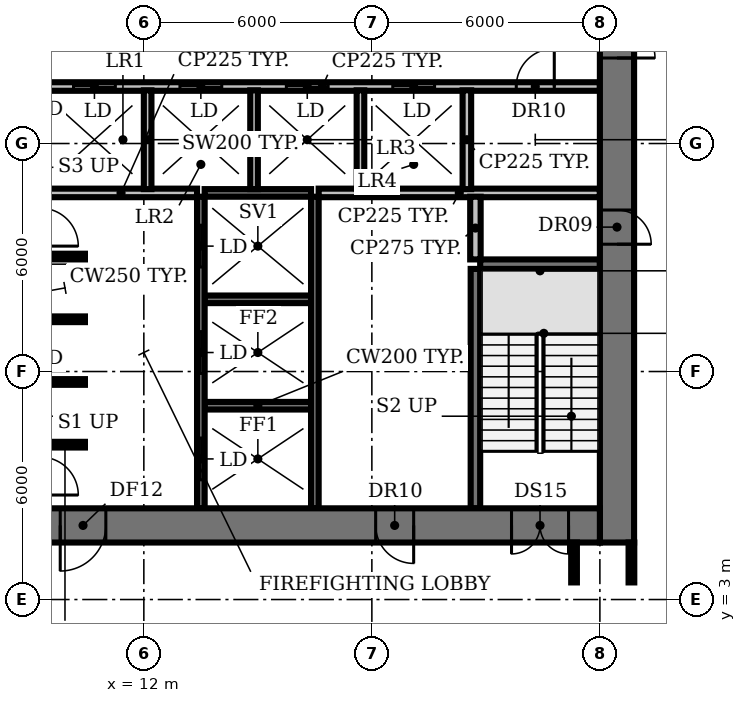
"""IFC4 building model, lengths in metres.
Left out: names, types, materials, properties, quantities, classifications, styles, units other than length and angle.
Written with IfcOpenShell. Run it as: python <this file> out.ifc"""

import sys

from ifc_helpers import new_model, si_unit, direction, frame, frame_2d, origin, place, context, subcontext, project, spatial, rectangle, extrude, element, fill, save


model = new_model("IFC4")
c1 = context("Model", 3, precision=1e-05, world=origin(), true_north=direction((0.0, 1.0)))
c2 = subcontext(c1, "Body", "Model", "MODEL_VIEW")
j1 = project(units=[si_unit("LENGTHUNIT", "METRE"), si_unit("PLANEANGLEUNIT", "RADIAN")], contexts=[c1])
p1 = place(None, origin())
s1 = spatial("IfcSite", under=j1, at=p1, CompositionType="ELEMENT")
p2 = place(p1, origin())
s2 = spatial("IfcBuilding", under=s1, at=p2, CompositionType="ELEMENT")
p3 = place(p2, frame((0.0, 0.0, 11.0)))
s3 = spatial("IfcBuildingStorey", under=s2, at=p3, CompositionType="ELEMENT", Elevation=11.0)
p4 = place(p3, frame((9.4, 7.075, 0.0), z_axis=(0.0, 0.0, 1.0), x_axis=(1.0, 0.0, 0.0)))
e1 = element("IfcWall", 1, at=p4, inside=s3, PredefinedType="SHEAR", context=c2, shape_type="SweptSolid", body=[
    extrude(rectangle(XDim=1.05, YDim=0.15, at=frame_2d((0.525, 0.0))), origin(), (0.0, 0.0, 1.0), 4.15),
])
p5 = place(p3, frame((13.6, 8.1, 0.0), z_axis=(0.0, 0.0, 1.0), x_axis=(1.0, 0.0, 0.0)))
e2 = element("IfcWall", 2, at=p5, inside=s3, PredefinedType="SHEAR", context=c2, shape_type="SweptSolid", body=[
    extrude(rectangle(XDim=2.8, YDim=0.2, at=frame_2d((1.4, 0.0))), origin(), (0.0, 0.0, 1.0), 4.15),
])
for number, where, z_axis, x_axis in (
    (3, (9.4, 8.725, 0.0), (0.0, 0.0, 1.0), (1.0, 0.0, 0.0)),
    (4, (9.4, 10.375, 0.0), (0.0, 0.0, 1.0), (1.0, 0.0, 0.0)),
):
    element("IfcWall", number, at=place(p3, frame(where, z_axis=z_axis, x_axis=x_axis)), inside=s3, PredefinedType="SHEAR", context=c2, shape_type="SweptSolid", body=[
        extrude(rectangle(XDim=1.05, YDim=0.15, at=frame_2d((0.525, 0.0))), origin(), (0.0, 0.0, 1.0), 4.15),
    ])
p6 = place(p3, frame((13.6, 10.9, 0.0), z_axis=(0.0, 0.0, 1.0), x_axis=(1.0, 0.0, 0.0)))
e5 = element("IfcWall", 5, at=p6, inside=s3, PredefinedType="SHEAR", context=c2, shape_type="SweptSolid", body=[
    extrude(rectangle(XDim=2.8, YDim=0.2, at=frame_2d((1.4, 0.0))), origin(), (0.0, 0.0, 1.0), 4.15),
])
p7 = place(p3, frame((20.85, 11.825, 0.0), z_axis=(0.0, 0.0, 1.0), x_axis=(1.0, 0.0, 0.0)))
e6 = element("IfcWall", 6, at=p7, inside=s3, PredefinedType="SHEAR", context=c2, shape_type="SweptSolid", body=[
    extrude(rectangle(XDim=3.15, YDim=0.25, at=frame_2d((1.575, 0.0))), origin(), (0.0, 0.0, 1.0), 4.15),
])
p8 = place(p3, frame((9.4, 12.025, 0.0), z_axis=(0.0, 0.0, 1.0), x_axis=(1.0, 0.0, 0.0)))
e7 = element("IfcWall", 7, at=p8, inside=s3, PredefinedType="SHEAR", context=c2, shape_type="SweptSolid", body=[
    extrude(rectangle(XDim=1.05, YDim=0.15, at=frame_2d((0.525, 0.0))), origin(), (0.0, 0.0, 1.0), 4.15),
])
p9 = place(p3, frame((9.4, 13.7, 0.0), z_axis=(0.0, 0.0, 1.0), x_axis=(1.0, 0.0, 0.0)))
e8 = element("IfcWall", 8, at=p9, inside=s3, PredefinedType="PARTITIONING", context=c2, shape_type="SweptSolid", body=[
    extrude(rectangle(XDim=4.0, YDim=0.225, at=frame_2d((2.0, 0.0))), origin(), (0.0, 0.0, 1.0), 4.15),
])
p10 = place(p3, frame((13.6, 13.7, 0.0), z_axis=(0.0, 0.0, 1.0), x_axis=(1.0, 0.0, 0.0)))
e9 = element("IfcWall", 9, at=p10, inside=s3, PredefinedType="SHEAR", context=c2, shape_type="SweptSolid", body=[
    extrude(rectangle(XDim=2.8, YDim=0.2, at=frame_2d((1.4, 0.0))), origin(), (0.0, 0.0, 1.0), 4.15),
])
p11 = place(p3, frame((16.6, 13.7, 0.0), z_axis=(0.0, 0.0, 1.0), x_axis=(1.0, 0.0, 0.0)))
e10 = element("IfcWall", 10, at=p11, inside=s3, PredefinedType="PARTITIONING", context=c2, shape_type="SweptSolid", body=[
    extrude(rectangle(XDim=7.4, YDim=0.225, at=frame_2d((3.7, 0.0))), origin(), (0.0, 0.0, 1.0), 4.15),
])
p12 = place(p3, frame((9.4, 16.5, 0.0), z_axis=(0.0, 0.0, 1.0), x_axis=(1.0, 0.0, 0.0)))
e11 = element("IfcWall", 11, at=p12, inside=s3, PredefinedType="PARTITIONING", context=c2, shape_type="SweptSolid", body=[
    extrude(rectangle(XDim=14.6, YDim=0.225, at=frame_2d((7.3, 0.0))), origin(), (0.0, 0.0, 1.0), 4.15),
])
p13 = place(p12, frame((0.75, 0.0, 0.0)))
e12 = element("IfcOpeningElement", 12, at=p13, cuts=e11, PredefinedType="OPENING", context=c2, shape_type="SweptSolid", body=[
    extrude(rectangle(XDim=1.1, YDim=2.1, at=frame_2d((0.55, 1.05))), frame((0.0, 0.123, 0.0), z_axis=(0.0, -1.0, 0.0), x_axis=(1.0, 0.0, 0.0)), (0.0, 0.0, 1.0), 0.245),
])
p14 = place(p12, frame((3.55, 0.0, 0.0)))
e13 = element("IfcOpeningElement", 13, at=p14, cuts=e11, PredefinedType="OPENING", context=c2, shape_type="SweptSolid", body=[
    extrude(rectangle(XDim=1.1, YDim=2.1, at=frame_2d((0.55, 1.05))), frame((0.0, 0.123, 0.0), z_axis=(0.0, -1.0, 0.0), x_axis=(1.0, 0.0, 0.0)), (0.0, 0.0, 1.0), 0.245),
])
p15 = place(p12, frame((6.35, 0.0, 0.0)))
e14 = element("IfcOpeningElement", 14, at=p15, cuts=e11, PredefinedType="OPENING", context=c2, shape_type="SweptSolid", body=[
    extrude(rectangle(XDim=1.1, YDim=2.1, at=frame_2d((0.55, 1.05))), frame((0.0, 0.123, 0.0), z_axis=(0.0, -1.0, 0.0), x_axis=(1.0, 0.0, 0.0)), (0.0, 0.0, 1.0), 0.245),
])
p16 = place(p12, frame((9.15, 0.0, 0.0)))
e15 = element("IfcOpeningElement", 15, at=p16, cuts=e11, PredefinedType="OPENING", context=c2, shape_type="SweptSolid", body=[
    extrude(rectangle(XDim=1.1, YDim=2.1, at=frame_2d((0.55, 1.05))), frame((0.0, 0.123, 0.0), z_axis=(0.0, -1.0, 0.0), x_axis=(1.0, 0.0, 0.0)), (0.0, 0.0, 1.0), 0.245),
])
p17 = place(p12, frame((12.4, 0.0, 0.0)))
e16 = element("IfcOpeningElement", 16, at=p17, cuts=e11, PredefinedType="OPENING", context=c2, shape_type="SweptSolid", body=[
    extrude(rectangle(XDim=1.0, YDim=2.1, at=frame_2d((0.5, 1.05))), frame((0.0, 0.123, 0.0), z_axis=(0.0, -1.0, 0.0), x_axis=(1.0, 0.0, 0.0)), (0.0, 0.0, 1.0), 0.245),
])
p18 = place(p3, frame((12.1, 13.8, 0.0), z_axis=(0.0, 0.0, 1.0), x_axis=(0.0, 1.0, 0.0)))
e17 = element("IfcWall", 17, at=p18, inside=s3, PredefinedType="SOLIDWALL", context=c2, shape_type="SweptSolid", body=[
    extrude(rectangle(XDim=2.6, YDim=0.2, at=frame_2d((1.3, 0.0))), origin(), (0.0, 0.0, 1.0), 4.15),
])
p19 = place(p3, frame((13.5, 5.4, 0.0), z_axis=(0.0, 0.0, 1.0), x_axis=(0.0, 1.0, 0.0)))
e18 = element("IfcWall", 18, at=p19, inside=s3, PredefinedType="SHEAR", context=c2, shape_type="SweptSolid", body=[
    extrude(rectangle(XDim=8.2, YDim=0.2, at=frame_2d((4.1, 0.0))), origin(), (0.0, 0.0, 1.0), 4.15),
])
p20 = place(p19, frame((0.75, 0.0, 0.0)))
e19 = element("IfcOpeningElement", 19, at=p20, cuts=e18, PredefinedType="OPENING", context=c2, shape_type="SweptSolid", body=[
    extrude(rectangle(XDim=1.1, YDim=2.1, at=frame_2d((0.55, 1.05))), frame((0.0, 0.11, 0.0), z_axis=(0.0, -1.0, 0.0), x_axis=(1.0, 0.0, 0.0)), (0.0, 0.0, 1.0), 0.22),
])
p21 = place(p19, frame((3.55, 0.0, 0.0)))
e20 = element("IfcOpeningElement", 20, at=p21, cuts=e18, PredefinedType="OPENING", context=c2, shape_type="SweptSolid", body=[
    extrude(rectangle(XDim=1.1, YDim=2.1, at=frame_2d((0.55, 1.05))), frame((0.0, 0.11, 0.0), z_axis=(0.0, -1.0, 0.0), x_axis=(1.0, 0.0, 0.0)), (0.0, 0.0, 1.0), 0.22),
])
p22 = place(p19, frame((6.35, 0.0, 0.0)))
e21 = element("IfcOpeningElement", 21, at=p22, cuts=e18, PredefinedType="OPENING", context=c2, shape_type="SweptSolid", body=[
    extrude(rectangle(XDim=1.1, YDim=2.1, at=frame_2d((0.55, 1.05))), frame((0.0, 0.11, 0.0), z_axis=(0.0, -1.0, 0.0), x_axis=(1.0, 0.0, 0.0)), (0.0, 0.0, 1.0), 0.22),
])
p23 = place(p3, frame((14.9, 13.8, 0.0), z_axis=(0.0, 0.0, 1.0), x_axis=(0.0, 1.0, 0.0)))
e22 = element("IfcWall", 22, at=p23, inside=s3, PredefinedType="SOLIDWALL", context=c2, shape_type="SweptSolid", body=[
    extrude(rectangle(XDim=2.6, YDim=0.2, at=frame_2d((1.3, 0.0))), origin(), (0.0, 0.0, 1.0), 4.15),
])
p24 = place(p3, frame((16.5, 5.4, 0.0), z_axis=(0.0, 0.0, 1.0), x_axis=(0.0, 1.0, 0.0)))
e23 = element("IfcWall", 23, at=p24, inside=s3, PredefinedType="SHEAR", context=c2, shape_type="SweptSolid", body=[
    extrude(rectangle(XDim=8.2, YDim=0.2, at=frame_2d((4.1, 0.0))), origin(), (0.0, 0.0, 1.0), 4.15),
])
p25 = place(p3, frame((17.7, 13.8, 0.0), z_axis=(0.0, 0.0, 1.0), x_axis=(0.0, 1.0, 0.0)))
e24 = element("IfcWall", 24, at=p25, inside=s3, PredefinedType="SOLIDWALL", context=c2, shape_type="SweptSolid", body=[
    extrude(rectangle(XDim=2.6, YDim=0.2, at=frame_2d((1.3, 0.0))), origin(), (0.0, 0.0, 1.0), 4.15),
])
p26 = place(p3, frame((20.5, 13.8, 0.0), z_axis=(0.0, 0.0, 1.0), x_axis=(0.0, 1.0, 0.0)))
e25 = element("IfcWall", 25, at=p26, inside=s3, PredefinedType="PARTITIONING", context=c2, shape_type="SweptSolid", body=[
    extrude(rectangle(XDim=2.6, YDim=0.225, at=frame_2d((1.3, 0.0))), origin(), (0.0, 0.0, 1.0), 4.15),
])
p27 = place(p3, frame((20.725, 5.4, 0.0), z_axis=(0.0, 0.0, 1.0), x_axis=(0.0, 1.0, 0.0)))
e26 = element("IfcWall", 26, at=p27, inside=s3, PredefinedType="SHEAR", context=c2, shape_type="SweptSolid", body=[
    extrude(rectangle(XDim=6.3, YDim=0.25, at=frame_2d((3.15, 0.0))), origin(), (0.0, 0.0, 1.0), 4.15),
])
p28 = place(p3, frame((20.725, 11.95, 0.0), z_axis=(0.0, 0.0, 1.0), x_axis=(0.0, 1.0, 0.0)))
e27 = element("IfcWall", 27, at=p28, inside=s3, PredefinedType="PARTITIONING", context=c2, shape_type="SweptSolid", body=[
    extrude(rectangle(XDim=1.65, YDim=0.275, at=frame_2d((0.825, 0.0))), origin(), (0.0, 0.0, 1.0), 4.15),
])
p29 = place(p3, frame((24.45, 25.7, 0.0), z_axis=(0.0, 0.0, 1.0), x_axis=(0.0, -1.0, 0.0)))
e28 = element("IfcWall", 28, at=p29, inside=s3, PredefinedType="SHEAR", context=c2, shape_type="SweptSolid", body=[
    extrude(rectangle(XDim=21.2, YDim=0.9, at=frame_2d((10.6, 0.0))), origin(), (0.0, 0.0, 1.0), 4.15),
])
p30 = place(p29, frame((12.45, 0.0, 0.0)))
e29 = element("IfcOpeningElement", 29, at=p30, cuts=e28, PredefinedType="OPENING", context=c2, shape_type="SweptSolid", body=[
    extrude(rectangle(XDim=0.9, YDim=2.1, at=frame_2d((0.45, 1.05))), frame((0.0, 0.46, 0.0), z_axis=(0.0, -1.0, 0.0), x_axis=(1.0, 0.0, 0.0)), (0.0, 0.0, 1.0), 0.92),
])
p31 = place(p29, frame((6.45, 0.0, 0.0)))
e30 = element("IfcOpeningElement", 30, at=p31, cuts=e28, PredefinedType="OPENING", context=c2, shape_type="SweptSolid", body=[
    extrude(rectangle(XDim=2.0, YDim=2.1, at=frame_2d((1.0, 1.05))), frame((0.0, 0.46, 0.0), z_axis=(0.0, -1.0, 0.0), x_axis=(1.0, 0.0, 0.0)), (0.0, 0.0, 1.0), 0.92),
])
p32 = place(p3, frame((24.0, 4.95, 0.0), z_axis=(0.0, 0.0, 1.0), x_axis=(-1.0, 0.0, 0.0)))
e31 = element("IfcWall", 31, at=p32, inside=s3, PredefinedType="SHEAR", context=c2, shape_type="SweptSolid", body=[
    extrude(rectangle(XDim=18.0, YDim=0.9, at=frame_2d((9.0, 0.0))), origin(), (0.0, 0.0, 1.0), 4.15),
])
p33 = place(p32, frame((15.675, 0.0, 0.0)))
e32 = element("IfcOpeningElement", 32, at=p33, cuts=e31, PredefinedType="OPENING", context=c2, shape_type="SweptSolid", body=[
    extrude(rectangle(XDim=1.5, YDim=2.1, at=frame_2d((0.75, 1.05))), frame((0.0, 0.46, 0.0), z_axis=(0.0, -1.0, 0.0), x_axis=(1.0, 0.0, 0.0)), (0.0, 0.0, 1.0), 0.92),
])
p34 = place(p32, frame((0.825, 0.0, 0.0)))
e33 = element("IfcOpeningElement", 33, at=p34, cuts=e31, PredefinedType="OPENING", context=c2, shape_type="SweptSolid", body=[
    extrude(rectangle(XDim=1.5, YDim=2.1, at=frame_2d((0.75, 1.05))), frame((0.0, 0.46, 0.0), z_axis=(0.0, -1.0, 0.0), x_axis=(1.0, 0.0, 0.0)), (0.0, 0.0, 1.0), 0.92),
])
p35 = place(p32, frame((13.0, 0.0, 0.0)))
e34 = element("IfcOpeningElement", 34, at=p35, cuts=e31, PredefinedType="OPENING", context=c2, shape_type="SweptSolid", body=[
    extrude(rectangle(XDim=1.2, YDim=2.1, at=frame_2d((0.6, 1.05))), frame((0.0, 0.46, 0.0), z_axis=(0.0, -1.0, 0.0), x_axis=(1.0, 0.0, 0.0)), (0.0, 0.0, 1.0), 0.92),
])
p36 = place(p32, frame((4.9, 0.0, 0.0)))
e35 = element("IfcOpeningElement", 35, at=p36, cuts=e31, PredefinedType="OPENING", context=c2, shape_type="SweptSolid", body=[
    extrude(rectangle(XDim=1.0, YDim=2.1, at=frame_2d((0.5, 1.05))), frame((0.0, 0.46, 0.0), z_axis=(0.0, -1.0, 0.0), x_axis=(1.0, 0.0, 0.0)), (0.0, 0.0, 1.0), 0.92),
])
for number, where, z_axis, x_axis in (
    (36, (23.32, 3.45, 0.0), (0.0, 0.0, 1.0), (0.0, 1.0, 0.0)),
    (37, (24.83, 3.45, 0.0), (0.0, 0.0, 1.0), (0.0, 1.0, 0.0)),
):
    element("IfcWall", number, at=place(p3, frame(where, z_axis=z_axis, x_axis=x_axis)), inside=s3, PredefinedType="PARTITIONING", context=c2, shape_type="SweptSolid", body=[
        extrude(rectangle(XDim=1.05, YDim=0.15, at=frame_2d((0.525, 0.0))), origin(), (0.0, 0.0, 1.0), 3.08),
    ])
p37 = place(p13, origin())
e38 = element("IfcDoor", 38, at=p37, inside=s3, OperationType="DOUBLE_DOOR_SLIDING", PredefinedType="DOOR", context=c2, shape_type="SweptSolid", body=[
    extrude(rectangle(XDim=1.1, YDim=2.1, at=frame_2d((0.55, 1.05))), frame((0.0, 0.025, 0.0), z_axis=(0.0, -1.0, 0.0), x_axis=(1.0, 0.0, 0.0)), (0.0, 0.0, 1.0), 0.05),
])
fill(e12, e38)
p38 = place(p14, origin())
e39 = element("IfcDoor", 39, at=p38, inside=s3, OperationType="DOUBLE_DOOR_SLIDING", PredefinedType="DOOR", context=c2, shape_type="SweptSolid", body=[
    extrude(rectangle(XDim=1.1, YDim=2.1, at=frame_2d((0.55, 1.05))), frame((0.0, 0.025, 0.0), z_axis=(0.0, -1.0, 0.0), x_axis=(1.0, 0.0, 0.0)), (0.0, 0.0, 1.0), 0.05),
])
fill(e13, e39)
p39 = place(p15, origin())
e40 = element("IfcDoor", 40, at=p39, inside=s3, OperationType="DOUBLE_DOOR_SLIDING", PredefinedType="DOOR", context=c2, shape_type="SweptSolid", body=[
    extrude(rectangle(XDim=1.1, YDim=2.1, at=frame_2d((0.55, 1.05))), frame((0.0, 0.025, 0.0), z_axis=(0.0, -1.0, 0.0), x_axis=(1.0, 0.0, 0.0)), (0.0, 0.0, 1.0), 0.05),
])
fill(e14, e40)
p40 = place(p16, origin())
e41 = element("IfcDoor", 41, at=p40, inside=s3, OperationType="DOUBLE_DOOR_SLIDING", PredefinedType="DOOR", context=c2, shape_type="SweptSolid", body=[
    extrude(rectangle(XDim=1.1, YDim=2.1, at=frame_2d((0.55, 1.05))), frame((0.0, 0.025, 0.0), z_axis=(0.0, -1.0, 0.0), x_axis=(1.0, 0.0, 0.0)), (0.0, 0.0, 1.0), 0.05),
])
fill(e15, e41)
p41 = place(p17, origin())
e42 = element("IfcDoor", 42, at=p41, inside=s3, OperationType="SINGLE_SWING_RIGHT", PredefinedType="DOOR", context=c2, shape_type="SweptSolid", body=[
    extrude(rectangle(XDim=1.0, YDim=2.1, at=frame_2d((0.5, 1.05))), frame((0.0, 0.025, 0.0), z_axis=(0.0, -1.0, 0.0), x_axis=(1.0, 0.0, 0.0)), (0.0, 0.0, 1.0), 0.05),
])
fill(e16, e42)
p42 = place(p20, origin())
e43 = element("IfcDoor", 43, at=p42, inside=s3, OperationType="DOUBLE_DOOR_SLIDING", PredefinedType="DOOR", context=c2, shape_type="SweptSolid", body=[
    extrude(rectangle(XDim=1.1, YDim=2.1, at=frame_2d((0.55, 1.05))), frame((0.0, 0.025, 0.0), z_axis=(0.0, -1.0, 0.0), x_axis=(1.0, 0.0, 0.0)), (0.0, 0.0, 1.0), 0.05),
])
fill(e19, e43)
p43 = place(p21, origin())
e44 = element("IfcDoor", 44, at=p43, inside=s3, OperationType="DOUBLE_DOOR_SLIDING", PredefinedType="DOOR", context=c2, shape_type="SweptSolid", body=[
    extrude(rectangle(XDim=1.1, YDim=2.1, at=frame_2d((0.55, 1.05))), frame((0.0, 0.025, 0.0), z_axis=(0.0, -1.0, 0.0), x_axis=(1.0, 0.0, 0.0)), (0.0, 0.0, 1.0), 0.05),
])
fill(e20, e44)
p44 = place(p22, origin())
e45 = element("IfcDoor", 45, at=p44, inside=s3, OperationType="DOUBLE_DOOR_SLIDING", PredefinedType="DOOR", context=c2, shape_type="SweptSolid", body=[
    extrude(rectangle(XDim=1.1, YDim=2.1, at=frame_2d((0.55, 1.05))), frame((0.0, 0.025, 0.0), z_axis=(0.0, -1.0, 0.0), x_axis=(1.0, 0.0, 0.0)), (0.0, 0.0, 1.0), 0.05),
])
fill(e21, e45)
p45 = place(p30, origin())
e46 = element("IfcDoor", 46, at=p45, inside=s3, OperationType="SINGLE_SWING_RIGHT", PredefinedType="DOOR", context=c2, shape_type="SweptSolid", body=[
    extrude(rectangle(XDim=0.9, YDim=2.1, at=frame_2d((0.45, 1.05))), frame((0.0, -0.39, 0.0), z_axis=(0.0, -1.0, 0.0), x_axis=(1.0, 0.0, 0.0)), (0.0, 0.0, 1.0), 0.05),
])
fill(e29, e46)
p46 = place(p31, origin())
e47 = element("IfcDoor", 47, at=p46, inside=s3, OperationType="DOUBLE_DOOR_SINGLE_SWING", PredefinedType="DOOR", context=c2, shape_type="SweptSolid", body=[
    extrude(rectangle(XDim=2.0, YDim=2.1, at=frame_2d((1.0, 1.05))), frame((0.0, 0.025, 0.0), z_axis=(0.0, -1.0, 0.0), x_axis=(1.0, 0.0, 0.0)), (0.0, 0.0, 1.0), 0.05),
])
fill(e30, e47)
p47 = place(p34, origin())
e48 = element("IfcDoor", 48, at=p47, inside=s3, OperationType="DOUBLE_DOOR_SINGLE_SWING", PredefinedType="DOOR", context=c2, shape_type="SweptSolid", body=[
    extrude(rectangle(XDim=1.5, YDim=2.1, at=frame_2d((0.75, 1.05))), frame((0.0, 0.025, 0.0), z_axis=(0.0, -1.0, 0.0), x_axis=(1.0, 0.0, 0.0)), (0.0, 0.0, 1.0), 0.05),
])
fill(e33, e48)
p48 = place(p35, origin())
e49 = element("IfcDoor", 49, at=p48, inside=s3, OperationType="SINGLE_SWING_RIGHT", PredefinedType="DOOR", context=c2, shape_type="SweptSolid", body=[
    extrude(rectangle(XDim=1.2, YDim=2.1, at=frame_2d((0.6, 1.05))), frame((0.0, 0.025, 0.0), z_axis=(0.0, -1.0, 0.0), x_axis=(1.0, 0.0, 0.0)), (0.0, 0.0, 1.0), 0.05),
])
fill(e34, e49)
p49 = place(p36, origin())
e50 = element("IfcDoor", 50, at=p49, inside=s3, OperationType="SINGLE_SWING_LEFT", PredefinedType="DOOR", context=c2, shape_type="SweptSolid", body=[
    extrude(rectangle(XDim=1.0, YDim=2.1, at=frame_2d((0.5, 1.05))), frame((0.0, -0.39, 0.0), z_axis=(0.0, -1.0, 0.0), x_axis=(1.0, 0.0, 0.0)), (0.0, 0.0, 1.0), 0.05),
])
fill(e35, e50)
save(model, sys.argv[1])
